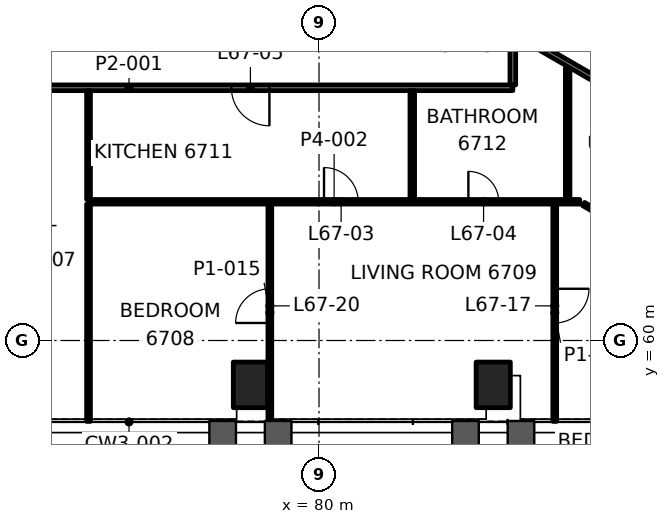
"""IFC4 building model, lengths in metres.
Left out: names, types, materials, properties, quantities, classifications, styles, units other than length and angle.
Written with IfcOpenShell. Run it as: python <this file> out.ifc"""

import sys

from ifc_helpers import new_model, si_unit, direction, frame, frame_2d, origin, origin_2d, place, context, subcontext, project, spatial, rectangle, hollow_rectangle, extrude, element, fill, save


model = new_model("IFC4")
c1 = context("Model", 3, precision=1e-05, world=origin(), true_north=direction((0.0, 1.0)))
c2 = subcontext(c1, "Body", "Model", "MODEL_VIEW")
j1 = project(units=[si_unit("LENGTHUNIT", "METRE"), si_unit("PLANEANGLEUNIT", "RADIAN")], contexts=[c1])
p1 = place(None, origin())
s1 = spatial("IfcSite", under=j1, at=p1, CompositionType="ELEMENT")
p2 = place(p1, origin())
s2 = spatial("IfcBuilding", under=s1, at=p2, CompositionType="ELEMENT")
p3 = place(p2, frame((0.0, 0.0, 281.1)))
s3 = spatial("IfcBuildingStorey", under=s2, at=p3, CompositionType="ELEMENT", Elevation=281.1)
for number, where, z_axis, x_axis in (
    (1, (78.195, 58.832, -0.0), (0.0, 0.0, 1.0), (1.0, 0.0, 0.0)),
    (2, (84.584, 58.832, -0.0), (0.0, 0.0, 1.0), (1.0, 0.0, 0.0)),
):
    element("IfcColumn", number, at=place(p3, frame(where, z_axis=z_axis, x_axis=x_axis)), inside=s3, PredefinedType="COLUMN", context=c2, shape_type="SweptSolid", body=[
        extrude(hollow_rectangle(XDim=0.9, YDim=1.2, WallThickness=0.06, at=origin_2d()), origin(), (0.0, 0.0, 1.0), 3.5),
    ])
p4 = place(p3, frame((73.935, 63.65, 0.0), z_axis=(0.0, 0.0, 1.0), x_axis=(1.0, 0.0, 0.0)))
e3 = element("IfcWall", 3, at=p4, inside=s3, PredefinedType="PARTITIONING", context=c2, shape_type="SweptSolid", body=[
    extrude(rectangle(XDim=12.924, YDim=0.12, at=frame_2d((6.462, 0.0))), origin(), (0.0, 0.0, 1.0), 2.7),
])
p5 = place(p4, frame((6.197, 0.0, 0.0)))
e4 = element("IfcOpeningElement", 4, at=p5, cuts=e3, PredefinedType="OPENING", context=c2, shape_type="SweptSolid", body=[
    extrude(rectangle(XDim=0.9, YDim=2.1, at=frame_2d((0.45, 1.05))), frame((0.0, 0.07, 0.0), z_axis=(0.0, -1.0, 0.0), x_axis=(1.0, 0.0, 0.0)), (0.0, 0.0, 1.0), 0.14),
])
p6 = place(p4, frame((9.995, 0.0, 0.0)))
e5 = element("IfcOpeningElement", 5, at=p6, cuts=e3, PredefinedType="OPENING", context=c2, shape_type="SweptSolid", body=[
    extrude(rectangle(XDim=0.8, YDim=2.1, at=frame_2d((0.4, 1.05))), frame((0.0, 0.07, 0.0), z_axis=(0.0, -1.0, 0.0), x_axis=(1.0, 0.0, 0.0)), (0.0, 0.0, 1.0), 0.14),
])
p7 = place(p3, frame((85.1, 66.65, 0.0), z_axis=(0.0, 0.0, 1.0), x_axis=(-1.0, 0.0, 0.0)))
e6 = element("IfcWall", 6, at=p7, inside=s3, PredefinedType="PARTITIONING", context=c2, shape_type="SweptSolid", body=[
    extrude(rectangle(XDim=20.2, YDim=0.15, at=frame_2d((10.1, 0.0))), origin(), (0.0, 0.0, 1.0), 2.7),
])
p8 = place(p7, frame((6.405, 0.0, 0.0)))
e7 = element("IfcOpeningElement", 7, at=p8, cuts=e6, PredefinedType="OPENING", context=c2, shape_type="SweptSolid", body=[
    extrude(rectangle(XDim=1.0, YDim=2.1, at=frame_2d((0.5, 1.05))), frame((0.0, 0.085, 0.0), z_axis=(0.0, -1.0, 0.0), x_axis=(1.0, 0.0, 0.0)), (0.0, 0.0, 1.0), 0.17),
])
p9 = place(p7, frame((12.845, 0.0, 0.0)))
e8 = element("IfcOpeningElement", 8, at=p9, cuts=e6, PredefinedType="OPENING", context=c2, shape_type="SweptSolid", body=[
    extrude(rectangle(XDim=0.9, YDim=2.1, at=frame_2d((0.45, 1.05))), frame((0.0, 0.085, 0.0), z_axis=(0.0, -1.0, 0.0), x_axis=(1.0, 0.0, 0.0)), (0.0, 0.0, 1.0), 0.17),
])
p10 = place(p3, frame((86.542, 63.71, 0.0), z_axis=(0.0, 0.0, 1.0), x_axis=(0.0, 1.0, 0.0)))
e9 = element("IfcWall", 9, at=p10, inside=s3, PredefinedType="PARTITIONING", context=c2, shape_type="SweptSolid", body=[
    extrude(rectangle(XDim=3.46, YDim=0.12, at=frame_2d((1.73, 0.0))), origin(), (0.0, 0.0, 1.0), 2.547),
])
p11 = place(p3, frame((86.203, 63.59, 0.0), z_axis=(0.0, 0.0, 1.0), x_axis=(0.0, -1.0, 0.0)))
e10 = element("IfcWall", 10, at=p11, inside=s3, PredefinedType="PARTITIONING", context=c2, shape_type="SweptSolid", body=[
    extrude(rectangle(XDim=5.718, YDim=0.1, at=frame_2d((2.859, 0.0))), origin(), (0.0, 0.0, 1.0), 2.7),
])
p12 = place(p11, frame((2.229, 0.0, 0.0)))
e11 = element("IfcOpeningElement", 11, at=p12, cuts=e10, PredefinedType="OPENING", context=c2, shape_type="SweptSolid", body=[
    extrude(rectangle(XDim=0.9, YDim=2.1, at=frame_2d((0.45, 1.05))), frame((0.0, 0.06, 0.0), z_axis=(0.0, -1.0, 0.0), x_axis=(1.0, 0.0, 0.0)), (0.0, 0.0, 1.0), 0.12),
])
p13 = place(p3, frame((85.1, 66.725, 0.0), z_axis=(0.0, 0.0, 1.0), x_axis=(0.0, 1.0, 0.0)))
e12 = element("IfcWall", 12, at=p13, inside=s3, PredefinedType="PARTITIONING", context=c2, shape_type="SweptSolid", body=[
    extrude(rectangle(XDim=1.268, YDim=0.15, at=frame_2d((0.634, 0.0))), origin(), (0.0, 0.0, 1.0), 2.547),
])
p14 = place(p3, frame((82.454, 63.71, 0.0), z_axis=(0.0, 0.0, 1.0), x_axis=(0.0, 1.0, 0.0)))
e13 = element("IfcWall", 13, at=p14, inside=s3, PredefinedType="PARTITIONING", context=c2, shape_type="SweptSolid", body=[
    extrude(rectangle(XDim=2.865, YDim=0.12, at=frame_2d((1.433, 0.0))), origin(), (0.0, 0.0, 1.0), 2.7),
])
p15 = place(p3, frame((78.706, 57.872, 0.0), z_axis=(0.0, 0.0, 1.0), x_axis=(0.0, 1.0, 0.0)))
e14 = element("IfcWall", 14, at=p15, inside=s3, PredefinedType="PARTITIONING", context=c2, shape_type="SweptSolid", body=[
    extrude(rectangle(XDim=5.718, YDim=0.1, at=frame_2d((2.859, 0.0))), origin(), (0.0, 0.0, 1.0), 2.688),
])
p16 = place(p15, frame((2.589, 0.0, 0.0)))
e15 = element("IfcOpeningElement", 15, at=p16, cuts=e14, PredefinedType="OPENING", context=c2, shape_type="SweptSolid", body=[
    extrude(rectangle(XDim=0.9, YDim=2.1, at=frame_2d((0.45, 1.05))), frame((0.0, 0.06, 0.0), z_axis=(0.0, -1.0, 0.0), x_axis=(1.0, 0.0, 0.0)), (0.0, 0.0, 1.0), 0.12),
])
p17 = place(p3, frame((73.935, 57.872, 0.0), z_axis=(0.0, 0.0, 1.0), x_axis=(0.0, 1.0, 0.0)))
e16 = element("IfcWall", 16, at=p17, inside=s3, PredefinedType="PARTITIONING", context=c2, shape_type="SweptSolid", body=[
    extrude(rectangle(XDim=5.718, YDim=0.1, at=frame_2d((2.859, 0.0))), origin(), (0.0, 0.0, 1.0), 2.688),
])
p18 = place(p3, frame((97.014, 63.329, 0.0), z_axis=(0.0, 0.0, 1.0), x_axis=(-0.866023045711, 0.500004084281, 0.0)))
e17 = element("IfcWall", 17, at=p18, inside=s3, PredefinedType="PARTITIONING", context=c2, shape_type="SweptSolid", body=[
    extrude(rectangle(XDim=13.757, YDim=0.15, at=frame_2d((6.879, 0.0))), origin(), (0.0, 0.0, 1.0), 2.7),
])
p19 = place(p18, frame((1.39, 0.0, 0.0)))
e18 = element("IfcOpeningElement", 18, at=p19, cuts=e17, PredefinedType="OPENING", context=c2, shape_type="SweptSolid", body=[
    extrude(rectangle(XDim=0.9, YDim=2.1, at=frame_2d((0.45, 1.05))), frame((0.0, 0.085, 0.0), z_axis=(0.0, -1.0, 0.0), x_axis=(1.0, 0.0, 0.0)), (0.0, 0.0, 1.0), 0.17),
])
p20 = place(p18, frame((4.821, 0.0, 0.0)))
e19 = element("IfcOpeningElement", 19, at=p20, cuts=e17, PredefinedType="OPENING", context=c2, shape_type="SweptSolid", body=[
    extrude(rectangle(XDim=1.0, YDim=2.1, at=frame_2d((0.5, 1.05))), frame((0.0, 0.085, 0.0), z_axis=(0.0, -1.0, 0.0), x_axis=(1.0, 0.0, 0.0)), (0.0, 0.0, 1.0), 0.17),
])
p21 = place(p18, frame((11.634, 0.0, 0.0)))
e20 = element("IfcOpeningElement", 20, at=p21, cuts=e17, PredefinedType="OPENING", context=c2, shape_type="SweptSolid", body=[
    extrude(rectangle(XDim=0.9, YDim=2.1, at=frame_2d((0.45, 1.05))), frame((0.0, 0.085, 0.0), z_axis=(0.0, -1.0, 0.0), x_axis=(1.0, 0.0, 0.0)), (0.0, 0.0, 1.0), 0.17),
])
p22 = place(p3, frame((96.114, 61.771, 0.0), z_axis=(0.0, 0.0, 1.0), x_axis=(-0.866021912989, 0.500006046186, 0.0)))
e21 = element("IfcWall", 21, at=p22, inside=s3, PredefinedType="PARTITIONING", context=c2, shape_type="SweptSolid", body=[
    extrude(rectangle(XDim=12.718, YDim=0.15, at=frame_2d((6.359, 0.0))), origin(), (0.0, 0.0, 1.0), 2.547),
])
p23 = place(p3, frame((86.963, 63.59, 0.0), z_axis=(0.0, 0.0, 1.0), x_axis=(0.866028993663, -0.499993782096, 0.0)))
e22 = element("IfcWall", 22, at=p23, inside=s3, PredefinedType="PARTITIONING", context=c2, shape_type="SweptSolid", body=[
    extrude(rectangle(XDim=4.543, YDim=0.1, at=frame_2d((2.272, 0.0))), origin(), (0.0, 0.0, 1.0), 2.7),
])
p24 = place(p23, frame((1.822, 0.0, 0.0)))
e23 = element("IfcOpeningElement", 23, at=p24, cuts=e22, PredefinedType="OPENING", context=c2, shape_type="SweptSolid", body=[
    extrude(rectangle(XDim=0.9, YDim=2.1, at=frame_2d((0.45, 1.05))), frame((0.0, 0.06, 0.0), z_axis=(0.0, -1.0, 0.0), x_axis=(1.0, 0.0, 0.0)), (0.0, 0.0, 1.0), 0.12),
])
p25 = place(p3, frame((73.935, 63.71, 0.0), z_axis=(0.0, 0.0, 1.0), x_axis=(0.0, 1.0, 0.0)))
e24 = element("IfcWall", 24, at=p25, inside=s3, PredefinedType="PARTITIONING", context=c2, shape_type="SweptSolid", body=[
    extrude(rectangle(XDim=2.865, YDim=0.1, at=frame_2d((1.433, 0.0))), origin(), (0.0, 0.0, 1.0), 2.7),
])
p26 = place(p5, origin())
e25 = element("IfcDoor", 25, at=p26, inside=s3, OperationType="SINGLE_SWING_RIGHT", PredefinedType="DOOR", context=c2, shape_type="SweptSolid", body=[
    extrude(rectangle(XDim=0.9, YDim=2.1, at=frame_2d((0.45, 1.05))), frame((0.0, 0.025, 0.0), z_axis=(0.0, -1.0, 0.0), x_axis=(1.0, 0.0, 0.0)), (0.0, 0.0, 1.0), 0.05),
])
fill(e4, e25)
p27 = place(p6, origin())
e26 = element("IfcDoor", 26, at=p27, inside=s3, OperationType="SINGLE_SWING_LEFT", PredefinedType="DOOR", context=c2, shape_type="SweptSolid", body=[
    extrude(rectangle(XDim=0.8, YDim=2.1, at=frame_2d((0.4, 1.05))), frame((0.0, 0.025, 0.0), z_axis=(0.0, -1.0, 0.0), x_axis=(1.0, 0.0, 0.0)), (0.0, 0.0, 1.0), 0.05),
])
fill(e5, e26)
p28 = place(p8, origin())
e27 = element("IfcDoor", 27, at=p28, inside=s3, OperationType="SINGLE_SWING_RIGHT", PredefinedType="DOOR", context=c2, shape_type="SweptSolid", body=[
    extrude(rectangle(XDim=1.0, YDim=2.1, at=frame_2d((0.5, 1.05))), frame((0.0, 0.025, 0.0), z_axis=(0.0, -1.0, 0.0), x_axis=(1.0, 0.0, 0.0)), (0.0, 0.0, 1.0), 0.05),
])
fill(e7, e27)
p29 = place(p12, origin())
e28 = element("IfcDoor", 28, at=p29, inside=s3, OperationType="SINGLE_SWING_LEFT", PredefinedType="DOOR", context=c2, shape_type="SweptSolid", body=[
    extrude(rectangle(XDim=0.9, YDim=2.1, at=frame_2d((0.45, 1.05))), frame((0.0, 0.025, 0.0), z_axis=(0.0, -1.0, 0.0), x_axis=(1.0, 0.0, 0.0)), (0.0, 0.0, 1.0), 0.05),
])
fill(e11, e28)
p30 = place(p16, origin())
e29 = element("IfcDoor", 29, at=p30, inside=s3, OperationType="SINGLE_SWING_LEFT", PredefinedType="DOOR", context=c2, shape_type="SweptSolid", body=[
    extrude(rectangle(XDim=0.9, YDim=2.1, at=frame_2d((0.45, 1.05))), frame((0.0, 0.025, 0.0), z_axis=(0.0, -1.0, 0.0), x_axis=(1.0, 0.0, 0.0)), (0.0, 0.0, 1.0), 0.05),
])
fill(e15, e29)
save(model, sys.argv[1])
